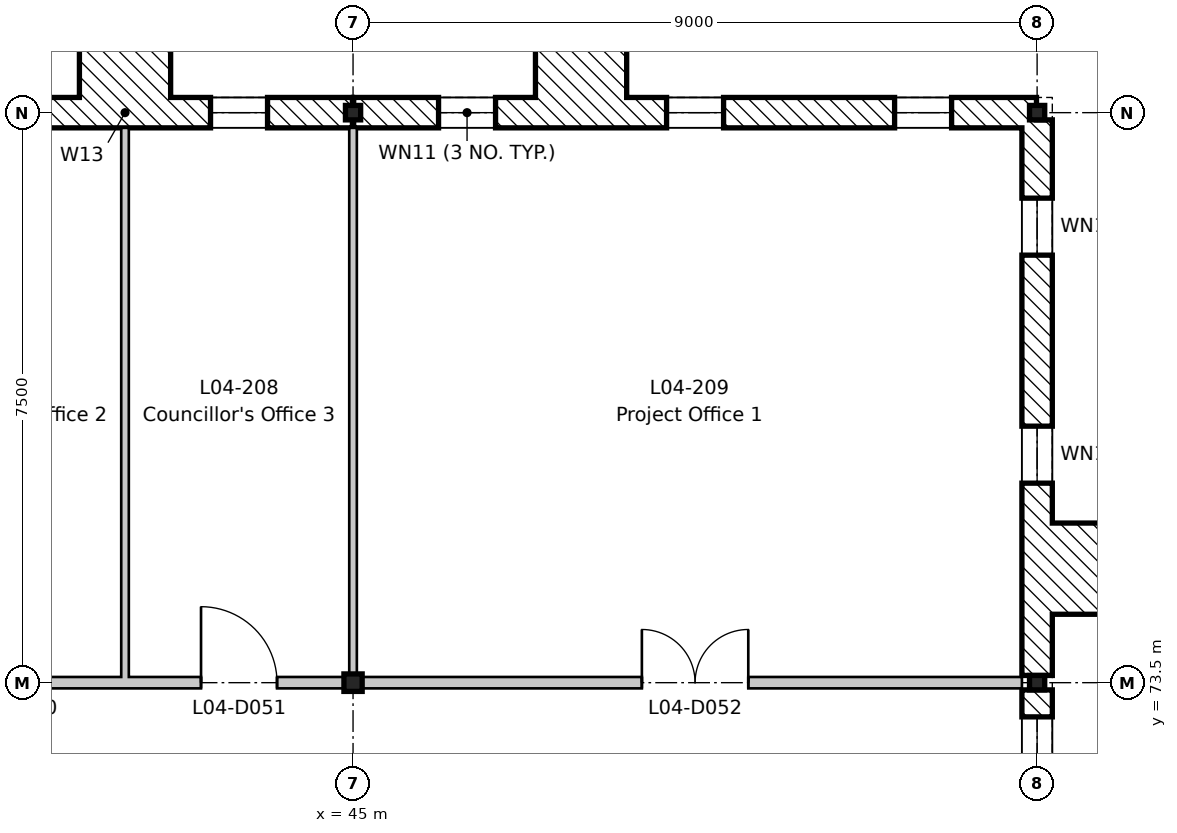
"""IFC4 building model, lengths in metres.
Left out: names, types, materials, properties, quantities, classifications, styles, units other than length and angle.
Written with IfcOpenShell. Run it as: python <this file> out.ifc"""

import sys

from ifc_helpers import new_model, si_unit, direction, frame, frame_2d, origin, origin_2d, place, context, subcontext, project, spatial, rectangle, i_section, extrude, element, fill, save


model = new_model("IFC4")
c1 = context("Model", 3, precision=1e-05, world=origin(), true_north=direction((0.0, 1.0)))
c2 = subcontext(c1, "Body", "Model", "MODEL_VIEW")
j1 = project(units=[si_unit("LENGTHUNIT", "METRE"), si_unit("PLANEANGLEUNIT", "RADIAN")], contexts=[c1])
p1 = place(None, origin())
s1 = spatial("IfcSite", under=j1, at=p1, CompositionType="ELEMENT")
p2 = place(p1, origin())
s2 = spatial("IfcBuilding", under=s1, at=p2, CompositionType="ELEMENT")
p3 = place(p2, frame((0.0, 0.0, 18.6)))
s3 = spatial("IfcBuildingStorey", under=s2, at=p3, CompositionType="ELEMENT", Elevation=18.6)
p4 = place(p3, frame((45.0, 73.5, -0.2), z_axis=(0.0, 0.0, 1.0), x_axis=(1.0, 0.0, 0.0)))
e1 = element("IfcColumn", 1, at=p4, inside=s3, PredefinedType="COLUMN", context=c2, shape_type="SweptSolid", body=[
    extrude(i_section(OverallWidth=0.24, OverallDepth=0.23, WebThickness=0.008, FlangeThickness=0.012, FilletRadius=0.021, at=origin_2d()), origin(), (0.0, 0.0, 1.0), 4.15),
])
for number, where, z_axis, x_axis in (
    (2, (45.0, 81.0, -0.2), (0.0, 0.0, 1.0), (1.0, 0.0, 0.0)),
    (3, (54.0, 73.5, -0.2), (0.0, 0.0, 1.0), (1.0, 0.0, 0.0)),
    (4, (54.0, 81.0, -0.2), (0.0, 0.0, 1.0), (1.0, 0.0, 0.0)),
):
    element("IfcColumn", number, at=place(p3, frame(where, z_axis=z_axis, x_axis=x_axis)), inside=s3, PredefinedType="COLUMN", context=c2, shape_type="SweptSolid", body=[
        extrude(i_section(OverallWidth=0.2, OverallDepth=0.19, WebThickness=0.007, FlangeThickness=0.01, FilletRadius=0.018, at=origin_2d()), origin(), (0.0, 0.0, 1.0), 4.15),
    ])
p5 = place(p3, frame((36.008, 81.0, 0.0), z_axis=(0.0, 0.0, 1.0), x_axis=(1.0, 0.0, 0.0)))
e5 = element("IfcWall", 5, at=p5, inside=s3, PredefinedType="STANDARD", context=c2, shape_type="SweptSolid", body=[
    extrude(rectangle(XDim=8.983, YDim=0.4, at=frame_2d((4.492, 0.0))), origin(), (0.0, 0.0, 1.0), 3.55),
])
p6 = place(p5, frame((1.117, 0.0, 1.5)))
e6 = element("IfcOpeningElement", 6, at=p6, cuts=e5, PredefinedType="OPENING", context=c2, shape_type="SweptSolid", body=[
    extrude(rectangle(XDim=0.75, YDim=1.2, at=frame_2d((0.375, 0.6))), frame((0.0, 0.21, 0.0), z_axis=(0.0, -1.0, 0.0), x_axis=(1.0, 0.0, 0.0)), (0.0, 0.0, 1.0), 0.42),
])
p7 = place(p5, frame((4.117, 0.0, 1.5)))
e7 = element("IfcOpeningElement", 7, at=p7, cuts=e5, PredefinedType="OPENING", context=c2, shape_type="SweptSolid", body=[
    extrude(rectangle(XDim=0.75, YDim=1.2, at=frame_2d((0.375, 0.6))), frame((0.0, 0.21, 0.0), z_axis=(0.0, -1.0, 0.0), x_axis=(1.0, 0.0, 0.0)), (0.0, 0.0, 1.0), 0.42),
])
p8 = place(p5, frame((7.117, 0.0, 1.5)))
e8 = element("IfcOpeningElement", 8, at=p8, cuts=e5, PredefinedType="OPENING", context=c2, shape_type="SweptSolid", body=[
    extrude(rectangle(XDim=0.75, YDim=1.2, at=frame_2d((0.375, 0.6))), frame((0.0, 0.21, 0.0), z_axis=(0.0, -1.0, 0.0), x_axis=(1.0, 0.0, 0.0)), (0.0, 0.0, 1.0), 0.42),
])
p9 = place(p3, frame((45.008, 81.0, 0.0), z_axis=(0.0, 0.0, 1.0), x_axis=(1.0, 0.0, 0.0)))
e9 = element("IfcWall", 9, at=p9, inside=s3, PredefinedType="STANDARD", context=c2, shape_type="SweptSolid", body=[
    extrude(rectangle(XDim=8.983, YDim=0.4, at=frame_2d((4.492, 0.0))), origin(), (0.0, 0.0, 1.0), 3.55),
])
p10 = place(p9, frame((1.117, 0.0, 1.5)))
e10 = element("IfcOpeningElement", 10, at=p10, cuts=e9, PredefinedType="OPENING", context=c2, shape_type="SweptSolid", body=[
    extrude(rectangle(XDim=0.75, YDim=1.2, at=frame_2d((0.375, 0.6))), frame((0.0, 0.21, 0.0), z_axis=(0.0, -1.0, 0.0), x_axis=(1.0, 0.0, 0.0)), (0.0, 0.0, 1.0), 0.42),
])
p11 = place(p9, frame((4.117, 0.0, 1.5)))
e11 = element("IfcOpeningElement", 11, at=p11, cuts=e9, PredefinedType="OPENING", context=c2, shape_type="SweptSolid", body=[
    extrude(rectangle(XDim=0.75, YDim=1.2, at=frame_2d((0.375, 0.6))), frame((0.0, 0.21, 0.0), z_axis=(0.0, -1.0, 0.0), x_axis=(1.0, 0.0, 0.0)), (0.0, 0.0, 1.0), 0.42),
])
p12 = place(p9, frame((7.117, 0.0, 1.5)))
e12 = element("IfcOpeningElement", 12, at=p12, cuts=e9, PredefinedType="OPENING", context=c2, shape_type="SweptSolid", body=[
    extrude(rectangle(XDim=0.75, YDim=1.2, at=frame_2d((0.375, 0.6))), frame((0.0, 0.21, 0.0), z_axis=(0.0, -1.0, 0.0), x_axis=(1.0, 0.0, 0.0)), (0.0, 0.0, 1.0), 0.42),
])
p13 = place(p3, frame((54.0, 73.405, 0.0), z_axis=(0.0, 0.0, 1.0), x_axis=(0.0, -1.0, 0.0)))
e13 = element("IfcWall", 13, at=p13, inside=s3, PredefinedType="STANDARD", context=c2, shape_type="SweptSolid", body=[
    extrude(rectangle(XDim=2.81, YDim=0.4, at=frame_2d((1.405, 0.0))), origin(), (0.0, 0.0, 1.0), 3.75),
])
p14 = place(p13, frame((0.355, 0.0, 0.9)))
e14 = element("IfcOpeningElement", 14, at=p14, cuts=e13, PredefinedType="OPENING", context=c2, shape_type="SweptSolid", body=[
    extrude(rectangle(XDim=2.1, YDim=2.1, at=frame_2d((1.05, 1.05))), frame((0.0, 0.21, 0.0), z_axis=(0.0, -1.0, 0.0), x_axis=(1.0, 0.0, 0.0)), (0.0, 0.0, 1.0), 0.42),
])
p15 = place(p3, frame((54.0, 80.905, 0.0), z_axis=(0.0, 0.0, 1.0), x_axis=(0.0, -1.0, 0.0)))
e15 = element("IfcWall", 15, at=p15, inside=s3, PredefinedType="STANDARD", context=c2, shape_type="SweptSolid", body=[
    extrude(rectangle(XDim=7.31, YDim=0.4, at=frame_2d((3.655, 0.0))), origin(), (0.0, 0.0, 1.0), 3.62),
])
p16 = place(p15, frame((4.03, 0.0, 1.5)))
e16 = element("IfcOpeningElement", 16, at=p16, cuts=e15, PredefinedType="OPENING", context=c2, shape_type="SweptSolid", body=[
    extrude(rectangle(XDim=0.75, YDim=1.2, at=frame_2d((0.375, 0.6))), frame((0.0, 0.21, 0.0), z_axis=(0.0, -1.0, 0.0), x_axis=(1.0, 0.0, 0.0)), (0.0, 0.0, 1.0), 0.42),
])
p17 = place(p15, frame((1.03, 0.0, 1.5)))
e17 = element("IfcOpeningElement", 17, at=p17, cuts=e15, PredefinedType="OPENING", context=c2, shape_type="SweptSolid", body=[
    extrude(rectangle(XDim=0.75, YDim=1.2, at=frame_2d((0.375, 0.6))), frame((0.0, 0.21, 0.0), z_axis=(0.0, -1.0, 0.0), x_axis=(1.0, 0.0, 0.0)), (0.0, 0.0, 1.0), 0.42),
])
for number, where, z_axis, x_axis in (
    (18, (41.4, 81.8, 0.0), (0.0, 0.0, 1.0), (1.0, 0.0, 0.0)),
    (19, (47.4, 81.8, 0.0), (0.0, 0.0, 1.0), (1.0, 0.0, 0.0)),
    (20, (54.8, 74.4, 0.0), (0.0, 0.0, 1.0), (0.0, 1.0, 0.0)),
):
    element("IfcWall", number, at=place(p3, frame(where, z_axis=z_axis, x_axis=x_axis)), inside=s3, PredefinedType="STANDARD", context=c2, shape_type="SweptSolid", body=[
        extrude(rectangle(XDim=1.2, YDim=1.2, at=frame_2d((0.6, 0.0))), origin(), (0.0, 0.0, 1.0), 3.35),
    ])
p18 = place(p3, frame((42.0, 73.575, 0.0), z_axis=(0.0, 0.0, 1.0), x_axis=(0.0, 1.0, 0.0)))
e21 = element("IfcWall", 21, at=p18, inside=s3, PredefinedType="PARTITIONING", context=c2, shape_type="SweptSolid", body=[
    extrude(rectangle(XDim=7.225, YDim=0.1, at=frame_2d((3.613, 0.0))), origin(), (0.0, 0.0, 1.0), 3.95),
])
p19 = place(p3, frame((45.0, 73.575, 0.0), z_axis=(0.0, 0.0, 1.0), x_axis=(0.0, 1.0, 0.0)))
e22 = element("IfcWall", 22, at=p19, inside=s3, PredefinedType="PARTITIONING", context=c2, shape_type="SweptSolid", body=[
    extrude(rectangle(XDim=7.225, YDim=0.1, at=frame_2d((3.613, 0.0))), origin(), (0.0, 0.0, 1.0), 3.6),
])
p20 = place(p3, frame((18.0, 73.5, 0.0), z_axis=(0.0, 0.0, 1.0), x_axis=(1.0, 0.0, 0.0)))
e23 = element("IfcWall", 23, at=p20, inside=s3, PredefinedType="PARTITIONING", context=c2, shape_type="SweptSolid", body=[
    extrude(rectangle(XDim=35.8, YDim=0.15, at=frame_2d((17.9, 0.0))), origin(), (0.0, 0.0, 1.0), 3.43),
])
p21 = place(p20, frame((10.3, 0.0, 0.0)))
e24 = element("IfcOpeningElement", 24, at=p21, cuts=e23, PredefinedType="OPENING", context=c2, shape_type="SweptSolid", body=[
    extrude(rectangle(XDim=1.4, YDim=2.1, at=frame_2d((0.7, 1.05))), frame((0.0, 0.085, 0.0), z_axis=(0.0, -1.0, 0.0), x_axis=(1.0, 0.0, 0.0)), (0.0, 0.0, 1.0), 0.17),
])
p22 = place(p20, frame((15.8, 0.0, 0.0)))
e25 = element("IfcOpeningElement", 25, at=p22, cuts=e23, PredefinedType="OPENING", context=c2, shape_type="SweptSolid", body=[
    extrude(rectangle(XDim=1.4, YDim=2.1, at=frame_2d((0.7, 1.05))), frame((0.0, 0.085, 0.0), z_axis=(0.0, -1.0, 0.0), x_axis=(1.0, 0.0, 0.0)), (0.0, 0.0, 1.0), 0.17),
])
p23 = place(p20, frame((22.0, 0.0, 0.0)))
e26 = element("IfcOpeningElement", 26, at=p23, cuts=e23, PredefinedType="OPENING", context=c2, shape_type="SweptSolid", body=[
    extrude(rectangle(XDim=1.0, YDim=2.1, at=frame_2d((0.5, 1.05))), frame((0.0, 0.085, 0.0), z_axis=(0.0, -1.0, 0.0), x_axis=(1.0, 0.0, 0.0)), (0.0, 0.0, 1.0), 0.17),
])
p24 = place(p20, frame((25.0, 0.0, 0.0)))
e27 = element("IfcOpeningElement", 27, at=p24, cuts=e23, PredefinedType="OPENING", context=c2, shape_type="SweptSolid", body=[
    extrude(rectangle(XDim=1.0, YDim=2.1, at=frame_2d((0.5, 1.05))), frame((0.0, 0.085, 0.0), z_axis=(0.0, -1.0, 0.0), x_axis=(1.0, 0.0, 0.0)), (0.0, 0.0, 1.0), 0.17),
])
p25 = place(p20, frame((30.8, 0.0, 0.0)))
e28 = element("IfcOpeningElement", 28, at=p25, cuts=e23, PredefinedType="OPENING", context=c2, shape_type="SweptSolid", body=[
    extrude(rectangle(XDim=1.4, YDim=2.1, at=frame_2d((0.7, 1.05))), frame((0.0, 0.085, 0.0), z_axis=(0.0, -1.0, 0.0), x_axis=(1.0, 0.0, 0.0)), (0.0, 0.0, 1.0), 0.17),
])
p26 = place(p8, origin())
e29 = element("IfcWindow", 29, at=p26, inside=s3, PartitioningType="SINGLE_PANEL", PredefinedType="WINDOW", context=c2, shape_type="SweptSolid", body=[
    extrude(rectangle(XDim=0.75, YDim=1.2, at=frame_2d((0.375, 0.6))), frame((0.0, -0.12, 0.0), z_axis=(0.0, -1.0, 0.0), x_axis=(1.0, 0.0, 0.0)), (0.0, 0.0, 1.0), 0.06),
])
fill(e8, e29)
p27 = place(p10, origin())
e30 = element("IfcWindow", 30, at=p27, inside=s3, PartitioningType="SINGLE_PANEL", PredefinedType="WINDOW", context=c2, shape_type="SweptSolid", body=[
    extrude(rectangle(XDim=0.75, YDim=1.2, at=frame_2d((0.375, 0.6))), frame((0.0, -0.12, 0.0), z_axis=(0.0, -1.0, 0.0), x_axis=(1.0, 0.0, 0.0)), (0.0, 0.0, 1.0), 0.06),
])
fill(e10, e30)
p28 = place(p11, origin())
e31 = element("IfcWindow", 31, at=p28, inside=s3, PartitioningType="SINGLE_PANEL", PredefinedType="WINDOW", context=c2, shape_type="SweptSolid", body=[
    extrude(rectangle(XDim=0.75, YDim=1.2, at=frame_2d((0.375, 0.6))), frame((0.0, -0.12, 0.0), z_axis=(0.0, -1.0, 0.0), x_axis=(1.0, 0.0, 0.0)), (0.0, 0.0, 1.0), 0.06),
])
fill(e11, e31)
p29 = place(p12, origin())
e32 = element("IfcWindow", 32, at=p29, inside=s3, PartitioningType="SINGLE_PANEL", PredefinedType="WINDOW", context=c2, shape_type="SweptSolid", body=[
    extrude(rectangle(XDim=0.75, YDim=1.2, at=frame_2d((0.375, 0.6))), frame((0.0, -0.12, 0.0), z_axis=(0.0, -1.0, 0.0), x_axis=(1.0, 0.0, 0.0)), (0.0, 0.0, 1.0), 0.06),
])
fill(e12, e32)
p30 = place(p14, origin())
e33 = element("IfcWindow", 33, at=p30, inside=s3, PartitioningType="SINGLE_PANEL", PredefinedType="WINDOW", context=c2, shape_type="SweptSolid", body=[
    extrude(rectangle(XDim=2.1, YDim=2.1, at=frame_2d((1.05, 1.05))), frame((0.0, -0.12, 0.0), z_axis=(0.0, -1.0, 0.0), x_axis=(1.0, 0.0, 0.0)), (0.0, 0.0, 1.0), 0.06),
])
fill(e14, e33)
p31 = place(p16, origin())
e34 = element("IfcWindow", 34, at=p31, inside=s3, PartitioningType="SINGLE_PANEL", PredefinedType="WINDOW", context=c2, shape_type="SweptSolid", body=[
    extrude(rectangle(XDim=0.75, YDim=1.2, at=frame_2d((0.375, 0.6))), frame((0.0, -0.12, 0.0), z_axis=(0.0, -1.0, 0.0), x_axis=(1.0, 0.0, 0.0)), (0.0, 0.0, 1.0), 0.06),
])
fill(e16, e34)
p32 = place(p17, origin())
e35 = element("IfcWindow", 35, at=p32, inside=s3, PartitioningType="SINGLE_PANEL", PredefinedType="WINDOW", context=c2, shape_type="SweptSolid", body=[
    extrude(rectangle(XDim=0.75, YDim=1.2, at=frame_2d((0.375, 0.6))), frame((0.0, -0.12, 0.0), z_axis=(0.0, -1.0, 0.0), x_axis=(1.0, 0.0, 0.0)), (0.0, 0.0, 1.0), 0.06),
])
fill(e17, e35)
p33 = place(p24, origin())
e36 = element("IfcDoor", 36, at=p33, inside=s3, OperationType="SINGLE_SWING_LEFT", PredefinedType="DOOR", context=c2, shape_type="SweptSolid", body=[
    extrude(rectangle(XDim=1.0, YDim=2.1, at=frame_2d((0.5, 1.05))), frame((0.0, 0.025, 0.0), z_axis=(0.0, -1.0, 0.0), x_axis=(1.0, 0.0, 0.0)), (0.0, 0.0, 1.0), 0.05),
])
fill(e27, e36)
p34 = place(p25, origin())
e37 = element("IfcDoor", 37, at=p34, inside=s3, OperationType="DOUBLE_DOOR_SINGLE_SWING", PredefinedType="DOOR", context=c2, shape_type="SweptSolid", body=[
    extrude(rectangle(XDim=1.4, YDim=2.1, at=frame_2d((0.7, 1.05))), frame((0.0, 0.025, 0.0), z_axis=(0.0, -1.0, 0.0), x_axis=(1.0, 0.0, 0.0)), (0.0, 0.0, 1.0), 0.05),
])
fill(e28, e37)
save(model, sys.argv[1])
